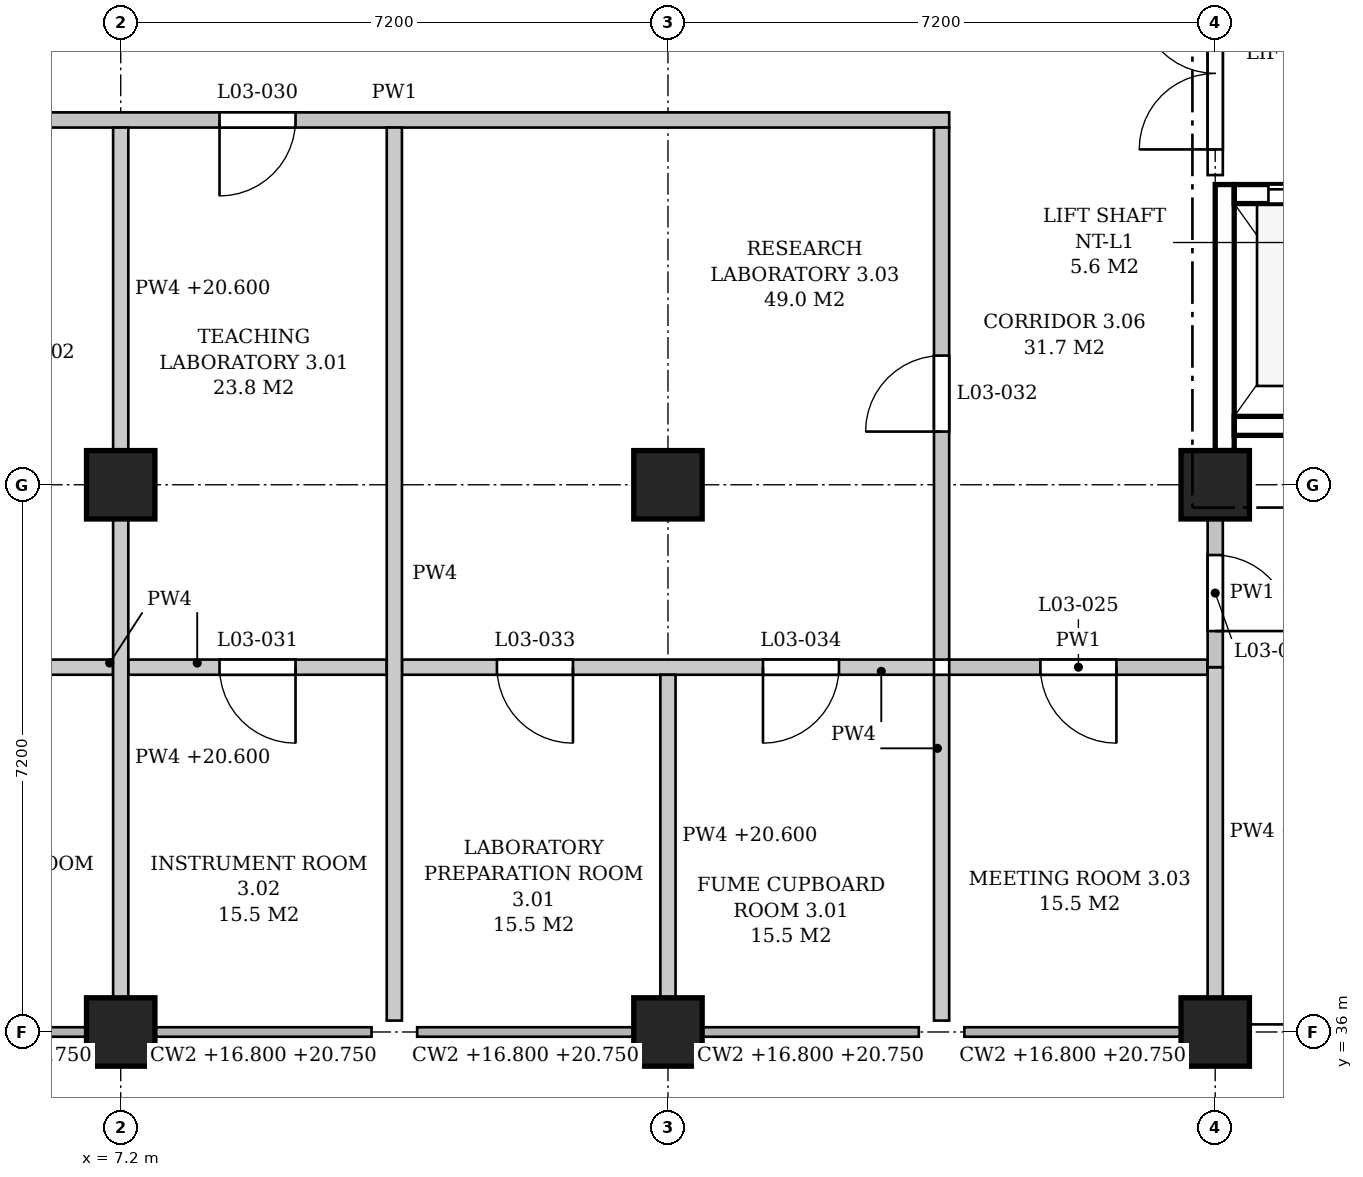
"""IFC4 building model, lengths in metres.
Left out: names, types, materials, properties, quantities, classifications, styles, units other than length and angle.
Written with IfcOpenShell. Run it as: python <this file> out.ifc"""

import sys

from ifc_helpers import new_model, si_unit, direction, frame, frame_2d, origin, origin_2d, place, context, subcontext, project, spatial, polyline, rectangle, outline, extrude, element, fill, save


model = new_model("IFC4")
c1 = context("Model", 3, precision=1e-05, world=origin(), true_north=direction((0.0, 1.0)))
c2 = subcontext(c1, "Body", "Model", "MODEL_VIEW")
j1 = project(units=[si_unit("LENGTHUNIT", "METRE"), si_unit("PLANEANGLEUNIT", "RADIAN")], contexts=[c1])
p1 = place(None, origin())
s1 = spatial("IfcSite", under=j1, at=p1, CompositionType="ELEMENT")
p2 = place(p1, origin())
s2 = spatial("IfcBuilding", under=s1, at=p2, CompositionType="ELEMENT")
p3 = place(p2, frame((0.0, 0.0, 16.8)))
s3 = spatial("IfcBuildingStorey", under=s2, at=p3, CompositionType="ELEMENT", Elevation=16.8)
for number, where, z_axis, x_axis in (
    (1, (7.2, 36.0, 0.0), (0.0, 0.0, 1.0), (1.0, 0.0, 0.0)),
    (2, (7.2, 43.2, 0.0), (0.0, 0.0, 1.0), (1.0, 0.0, 0.0)),
    (3, (14.4, 36.0, 0.0), (0.0, 0.0, 1.0), (1.0, 0.0, 0.0)),
    (4, (14.4, 43.2, 0.0), (0.0, 0.0, 1.0), (1.0, 0.0, 0.0)),
    (5, (21.6, 36.0, 0.0), (0.0, 0.0, 1.0), (1.0, 0.0, 0.0)),
    (6, (21.6, 43.2, 0.0), (0.0, 0.0, 1.0), (1.0, 0.0, 0.0)),
):
    element("IfcColumn", number, at=place(p3, frame(where, z_axis=z_axis, x_axis=x_axis)), inside=s3, PredefinedType="COLUMN", context=c2, shape_type="SweptSolid", body=[
        extrude(rectangle(XDim=0.9, YDim=0.9, at=origin_2d()), origin(), (0.0, 0.0, 1.0), 4.8),
    ])
p4 = place(p3, frame((21.725, 43.65, -0.25), z_axis=(0.0, 0.0, 1.0), x_axis=(0.0, 1.0, 0.0)))
e7 = element("IfcWall", 7, at=p4, inside=s3, PredefinedType="SHEAR", context=c2, shape_type="SweptSolid", body=[
    extrude(rectangle(XDim=3.5, YDim=0.25, at=frame_2d((1.75, 0.0))), origin(), (0.0, 0.0, 1.0), 4.05),
])
p5 = place(p3, frame((21.85, 47.025, -0.25), z_axis=(0.0, 0.0, 1.0), x_axis=(1.0, 0.0, 0.0)))
e8 = element("IfcWall", 8, at=p5, inside=s3, PredefinedType="SHEAR", context=c2, shape_type="SweptSolid", body=[
    extrude(rectangle(XDim=2.0, YDim=0.25, at=frame_2d((1.0, 0.0))), origin(), (0.0, 0.0, 1.0), 4.8),
])
p6 = place(p5, frame((0.45, 0.0, 0.25)))
e9 = element("IfcOpeningElement", 9, at=p6, cuts=e8, PredefinedType="OPENING", context=c2, shape_type="SweptSolid", body=[
    extrude(rectangle(XDim=1.1, YDim=2.1, at=frame_2d((0.55, 1.05))), frame((0.0, 0.135, 0.0), z_axis=(0.0, -1.0, 0.0), x_axis=(1.0, 0.0, 0.0)), (0.0, 0.0, 1.0), 0.27),
])
p7 = place(p3, frame((21.85, 43.975, -0.25), z_axis=(0.0, 0.0, 1.0), x_axis=(1.0, 0.0, 0.0)))
e10 = element("IfcWall", 10, at=p7, inside=s3, PredefinedType="SHEAR", context=c2, shape_type="SweptSolid", body=[
    extrude(rectangle(XDim=2.0, YDim=0.25, at=frame_2d((1.0, 0.0))), origin(), (0.0, 0.0, 1.0), 4.8),
])
p8 = place(p3, frame((3.7, 40.8, 0.0), z_axis=(0.0, 0.0, 1.0), x_axis=(1.0, 0.0, 0.0)))
e11 = element("IfcWall", 11, at=p8, inside=s3, PredefinedType="PARTITIONING", context=c2, shape_type="SweptSolid", body=[
    extrude(outline(polyline([(0.0, 0.0), (3.4, 0.0), (3.4, 3.8), (3.25, 3.8), (3.25, 4.55), (0.0, 4.55), (0.0, 0.0)])), frame((0.0, 0.1, 0.0), z_axis=(0.0, -1.0, 0.0), x_axis=(1.0, 0.0, 0.0)), (0.0, 0.0, 1.0), 0.2),
])
p9 = place(p8, frame((1.2, 0.0, 0.0)))
e12 = element("IfcOpeningElement", 12, at=p9, cuts=e11, PredefinedType="OPENING", context=c2, shape_type="SweptSolid", body=[
    extrude(rectangle(XDim=1.0, YDim=2.1, at=frame_2d((0.5, 1.05))), frame((0.0, 0.11, 0.0), z_axis=(0.0, -1.0, 0.0), x_axis=(1.0, 0.0, 0.0)), (0.0, 0.0, 1.0), 0.22),
])
p10 = place(p3, frame((7.3, 40.8, 0.0), z_axis=(0.0, 0.0, 1.0), x_axis=(1.0, 0.0, 0.0)))
e13 = element("IfcWall", 13, at=p10, inside=s3, PredefinedType="PARTITIONING", context=c2, shape_type="SweptSolid", body=[
    extrude(outline(polyline([(0.0, 0.0), (3.4, 0.0), (3.4, 4.55), (0.15, 4.55), (0.15, 3.8), (0.0, 3.8), (0.0, 0.0)])), frame((0.0, 0.1, 0.0), z_axis=(0.0, -1.0, 0.0), x_axis=(1.0, 0.0, 0.0)), (0.0, 0.0, 1.0), 0.2),
])
p11 = place(p10, frame((1.2, 0.0, 0.0)))
e14 = element("IfcOpeningElement", 14, at=p11, cuts=e13, PredefinedType="OPENING", context=c2, shape_type="SweptSolid", body=[
    extrude(rectangle(XDim=1.0, YDim=2.1, at=frame_2d((0.5, 1.05))), frame((0.0, 0.11, 0.0), z_axis=(0.0, -1.0, 0.0), x_axis=(1.0, 0.0, 0.0)), (0.0, 0.0, 1.0), 0.22),
])
p12 = place(p3, frame((10.9, 40.8, 0.0), z_axis=(0.0, 0.0, 1.0), x_axis=(1.0, 0.0, 0.0)))
e15 = element("IfcWall", 15, at=p12, inside=s3, PredefinedType="PARTITIONING", context=c2, shape_type="SweptSolid", body=[
    extrude(outline(polyline([(0.0, 0.0), (7.0, 0.0), (7.0, 4.55), (3.75, 4.55), (3.75, 3.8), (3.25, 3.8), (3.25, 4.55), (0.0, 4.55), (0.0, 0.0)])), frame((0.0, 0.1, 0.0), z_axis=(0.0, -1.0, 0.0), x_axis=(1.0, 0.0, 0.0)), (0.0, 0.0, 1.0), 0.2),
])
p13 = place(p12, frame((1.25, 0.0, 0.0)))
e16 = element("IfcOpeningElement", 16, at=p13, cuts=e15, PredefinedType="OPENING", context=c2, shape_type="SweptSolid", body=[
    extrude(rectangle(XDim=1.0, YDim=2.1, at=frame_2d((0.5, 1.05))), frame((0.0, 0.11, 0.0), z_axis=(0.0, -1.0, 0.0), x_axis=(1.0, 0.0, 0.0)), (0.0, 0.0, 1.0), 0.22),
])
p14 = place(p12, frame((4.75, 0.0, 0.0)))
e17 = element("IfcOpeningElement", 17, at=p14, cuts=e15, PredefinedType="OPENING", context=c2, shape_type="SweptSolid", body=[
    extrude(rectangle(XDim=1.0, YDim=2.1, at=frame_2d((0.5, 1.05))), frame((0.0, 0.11, 0.0), z_axis=(0.0, -1.0, 0.0), x_axis=(1.0, 0.0, 0.0)), (0.0, 0.0, 1.0), 0.22),
])
p15 = place(p3, frame((18.1, 40.8, 0.0), z_axis=(0.0, 0.0, 1.0), x_axis=(1.0, 0.0, 0.0)))
e18 = element("IfcWall", 18, at=p15, inside=s3, PredefinedType="PARTITIONING", context=c2, shape_type="SweptSolid", body=[
    extrude(outline(polyline([(0.0, 0.0), (3.4, 0.0), (3.4, 3.8), (3.25, 3.8), (3.25, 4.55), (0.0, 4.55), (0.0, 0.0)])), frame((0.0, 0.1, 0.0), z_axis=(0.0, -1.0, 0.0), x_axis=(1.0, 0.0, 0.0)), (0.0, 0.0, 1.0), 0.2),
])
p16 = place(p15, frame((1.2, 0.0, 0.0)))
e19 = element("IfcOpeningElement", 19, at=p16, cuts=e18, PredefinedType="OPENING", context=c2, shape_type="SweptSolid", body=[
    extrude(rectangle(XDim=1.0, YDim=2.1, at=frame_2d((0.5, 1.05))), frame((0.0, 0.11, 0.0), z_axis=(0.0, -1.0, 0.0), x_axis=(1.0, 0.0, 0.0)), (0.0, 0.0, 1.0), 0.22),
])
p17 = place(p3, frame((3.5, 48.0, 0.0), z_axis=(0.0, 0.0, 1.0), x_axis=(1.0, 0.0, 0.0)))
e20 = element("IfcWall", 20, at=p17, inside=s3, PredefinedType="PARTITIONING", context=c2, shape_type="SweptSolid", body=[
    extrude(outline(polyline([(0.0, 0.0), (14.6, 0.0), (14.6, 4.55), (11.15, 4.55), (11.15, 3.8), (10.65, 3.8), (10.65, 4.55), (3.95, 4.55), (3.95, 3.8), (3.45, 3.8), (3.45, 4.55), (0.0, 4.55), (0.0, 0.0)])), frame((0.0, 0.1, 0.0), z_axis=(0.0, -1.0, 0.0), x_axis=(1.0, 0.0, 0.0)), (0.0, 0.0, 1.0), 0.2),
])
p18 = place(p17, frame((1.4, 0.0, 0.0)))
e21 = element("IfcOpeningElement", 21, at=p18, cuts=e20, PredefinedType="OPENING", context=c2, shape_type="SweptSolid", body=[
    extrude(rectangle(XDim=1.0, YDim=2.1, at=frame_2d((0.5, 1.05))), frame((0.0, 0.11, 0.0), z_axis=(0.0, -1.0, 0.0), x_axis=(1.0, 0.0, 0.0)), (0.0, 0.0, 1.0), 0.22),
])
p19 = place(p17, frame((5.0, 0.0, 0.0)))
e22 = element("IfcOpeningElement", 22, at=p19, cuts=e20, PredefinedType="OPENING", context=c2, shape_type="SweptSolid", body=[
    extrude(rectangle(XDim=1.0, YDim=2.1, at=frame_2d((0.5, 1.05))), frame((0.0, 0.11, 0.0), z_axis=(0.0, -1.0, 0.0), x_axis=(1.0, 0.0, 0.0)), (0.0, 0.0, 1.0), 0.22),
])
p20 = place(p3, frame((7.2, 36.45, 0.0), z_axis=(0.0, 0.0, 1.0), x_axis=(0.0, 1.0, 0.0)))
e23 = element("IfcWall", 23, at=p20, inside=s3, PredefinedType="PARTITIONING", context=c2, shape_type="SweptSolid", body=[
    extrude(rectangle(XDim=6.3, YDim=0.2, at=frame_2d((3.15, 0.0))), origin(), (0.0, 0.0, 1.0), 3.8),
])
p21 = place(p3, frame((7.2, 43.65, 0.0), z_axis=(0.0, 0.0, 1.0), x_axis=(0.0, 1.0, 0.0)))
e24 = element("IfcWall", 24, at=p21, inside=s3, PredefinedType="PARTITIONING", context=c2, shape_type="SweptSolid", body=[
    extrude(rectangle(XDim=4.25, YDim=0.2, at=frame_2d((2.125, 0.0))), origin(), (0.0, 0.0, 1.0), 3.8),
])
p22 = place(p3, frame((10.8, 36.15, 0.0), z_axis=(0.0, 0.0, 1.0), x_axis=(0.0, 1.0, 0.0)))
e25 = element("IfcWall", 25, at=p22, inside=s3, PredefinedType="PARTITIONING", context=c2, shape_type="SweptSolid", body=[
    extrude(outline(polyline([(0.0, 0.0), (11.75, 0.0), (11.75, 4.55), (7.3, 4.55), (7.3, 3.8), (6.8, 3.8), (6.8, 4.55), (0.1, 4.55), (0.1, 3.95), (0.0, 3.95), (0.0, 0.0)])), frame((0.0, 0.1, 0.0), z_axis=(0.0, -1.0, 0.0), x_axis=(1.0, 0.0, 0.0)), (0.0, 0.0, 1.0), 0.2),
])
p23 = place(p3, frame((14.4, 36.45, 0.0), z_axis=(0.0, 0.0, 1.0), x_axis=(0.0, 1.0, 0.0)))
e26 = element("IfcWall", 26, at=p23, inside=s3, PredefinedType="PARTITIONING", context=c2, shape_type="SweptSolid", body=[
    extrude(rectangle(XDim=4.25, YDim=0.2, at=frame_2d((2.125, 0.0))), origin(), (0.0, 0.0, 1.0), 3.8),
])
p24 = place(p3, frame((18.0, 36.15, 0.0), z_axis=(0.0, 0.0, 1.0), x_axis=(0.0, 1.0, 0.0)))
e27 = element("IfcWall", 27, at=p24, inside=s3, PredefinedType="PARTITIONING", context=c2, shape_type="SweptSolid", body=[
    extrude(outline(polyline([(0.0, 0.0), (4.55, 0.0), (4.55, 4.55), (0.1, 4.55), (0.1, 3.95), (0.0, 3.95), (0.0, 0.0)])), frame((0.0, 0.1, 0.0), z_axis=(0.0, -1.0, 0.0), x_axis=(1.0, 0.0, 0.0)), (0.0, 0.0, 1.0), 0.2),
])
p25 = place(p3, frame((18.0, 40.9, 0.0), z_axis=(0.0, 0.0, 1.0), x_axis=(0.0, 1.0, 0.0)))
e28 = element("IfcWall", 28, at=p25, inside=s3, PredefinedType="PARTITIONING", context=c2, shape_type="SweptSolid", body=[
    extrude(outline(polyline([(0.0, 0.0), (7.0, 0.0), (7.0, 4.55), (2.55, 4.55), (2.55, 3.8), (2.05, 3.8), (2.05, 4.55), (0.0, 4.55), (0.0, 0.0)])), frame((0.0, 0.1, 0.0), z_axis=(0.0, -1.0, 0.0), x_axis=(1.0, 0.0, 0.0)), (0.0, 0.0, 1.0), 0.2),
])
p26 = place(p25, frame((3.0, 0.0, 0.0)))
e29 = element("IfcOpeningElement", 29, at=p26, cuts=e28, PredefinedType="OPENING", context=c2, shape_type="SweptSolid", body=[
    extrude(rectangle(XDim=1.0, YDim=2.1, at=frame_2d((0.5, 1.05))), frame((0.0, 0.11, 0.0), z_axis=(0.0, -1.0, 0.0), x_axis=(1.0, 0.0, 0.0)), (0.0, 0.0, 1.0), 0.22),
])
p27 = place(p3, frame((21.6, 36.45, 0.0), z_axis=(0.0, 0.0, 1.0), x_axis=(0.0, 1.0, 0.0)))
e30 = element("IfcWall", 30, at=p27, inside=s3, PredefinedType="PARTITIONING", context=c2, shape_type="SweptSolid", body=[
    extrude(rectangle(XDim=4.35, YDim=0.2, at=frame_2d((2.175, 0.0))), origin(), (0.0, 0.0, 1.0), 3.8),
])
p28 = place(p3, frame((21.6, 40.8, 0.0), z_axis=(0.0, 0.0, 1.0), x_axis=(0.0, 1.0, 0.0)))
e31 = element("IfcWall", 31, at=p28, inside=s3, PredefinedType="PARTITIONING", context=c2, shape_type="SweptSolid", body=[
    extrude(rectangle(XDim=1.95, YDim=0.2, at=frame_2d((0.975, 0.0))), origin(), (0.0, 0.0, 1.0), 3.8),
])
p29 = place(p28, frame((0.475, 0.0, 0.0)))
e32 = element("IfcOpeningElement", 32, at=p29, cuts=e31, PredefinedType="OPENING", context=c2, shape_type="SweptSolid", body=[
    extrude(rectangle(XDim=1.0, YDim=2.1, at=frame_2d((0.5, 1.05))), frame((0.0, 0.11, 0.0), z_axis=(0.0, -1.0, 0.0), x_axis=(1.0, 0.0, 0.0)), (0.0, 0.0, 1.0), 0.22),
])
p30 = place(p3, frame((21.6, 47.275, 0.0), z_axis=(0.0, 0.0, 1.0), x_axis=(0.0, 1.0, 0.0)))
e33 = element("IfcWall", 33, at=p30, inside=s3, PredefinedType="PARTITIONING", context=c2, shape_type="SweptSolid", body=[
    extrude(rectangle(XDim=2.675, YDim=0.2, at=frame_2d((1.337, 0.0))), origin(), (0.0, 0.0, 1.0), 3.8),
])
p31 = place(p30, frame((0.337, 0.0, 0.0)))
e34 = element("IfcOpeningElement", 34, at=p31, cuts=e33, PredefinedType="OPENING", context=c2, shape_type="SweptSolid", body=[
    extrude(rectangle(XDim=2.0, YDim=2.4, at=frame_2d((1.0, 1.2))), frame((0.0, 0.11, 0.0), z_axis=(0.0, -1.0, 0.0), x_axis=(1.0, 0.0, 0.0)), (0.0, 0.0, 1.0), 0.22),
])
p32 = place(p6, origin())
e35 = element("IfcDoor", 35, at=p32, inside=s3, OperationType="SLIDING_TO_LEFT", PredefinedType="DOOR", context=c2, shape_type="SweptSolid", body=[
    extrude(rectangle(XDim=1.1, YDim=2.1, at=frame_2d((0.55, 1.05))), frame((0.0, 0.025, 0.0), z_axis=(0.0, -1.0, 0.0), x_axis=(1.0, 0.0, 0.0)), (0.0, 0.0, 1.0), 0.05),
])
fill(e9, e35)
p33 = place(p31, origin())
e36 = element("IfcDoor", 36, at=p33, inside=s3, OperationType="DOUBLE_DOOR_SINGLE_SWING", PredefinedType="DOOR", context=c2, shape_type="SweptSolid", body=[
    extrude(rectangle(XDim=2.0, YDim=2.4, at=frame_2d((1.0, 1.2))), frame((0.0, 0.025, 0.0), z_axis=(0.0, -1.0, 0.0), x_axis=(1.0, 0.0, 0.0)), (0.0, 0.0, 1.0), 0.05),
])
fill(e34, e36)
p34 = place(p16, frame((1.0, 0.0, 0.0), z_axis=(0.0, 0.0, 1.0), x_axis=(-1.0, 0.0, 0.0)))
e37 = element("IfcDoor", 37, at=p34, inside=s3, OperationType="SINGLE_SWING_LEFT", PredefinedType="DOOR", context=c2, shape_type="SweptSolid", body=[
    extrude(rectangle(XDim=1.0, YDim=2.1, at=frame_2d((0.5, 1.05))), frame((0.0, 0.025, 0.0), z_axis=(0.0, -1.0, 0.0), x_axis=(1.0, 0.0, 0.0)), (0.0, 0.0, 1.0), 0.05),
])
fill(e19, e37)
p35 = place(p29, frame((1.0, 0.0, 0.0), z_axis=(0.0, 0.0, 1.0), x_axis=(-1.0, 0.0, 0.0)))
e38 = element("IfcDoor", 38, at=p35, inside=s3, OperationType="SINGLE_SWING_RIGHT", PredefinedType="DOOR", context=c2, shape_type="SweptSolid", body=[
    extrude(rectangle(XDim=1.0, YDim=2.1, at=frame_2d((0.5, 1.05))), frame((0.0, 0.025, 0.0), z_axis=(0.0, -1.0, 0.0), x_axis=(1.0, 0.0, 0.0)), (0.0, 0.0, 1.0), 0.05),
])
fill(e32, e38)
p36 = place(p19, frame((1.0, 0.0, 0.0), z_axis=(0.0, 0.0, 1.0), x_axis=(-1.0, 0.0, 0.0)))
e39 = element("IfcDoor", 39, at=p36, inside=s3, OperationType="SINGLE_SWING_RIGHT", PredefinedType="DOOR", context=c2, shape_type="SweptSolid", body=[
    extrude(rectangle(XDim=1.0, YDim=2.1, at=frame_2d((0.5, 1.05))), frame((0.0, 0.025, 0.0), z_axis=(0.0, -1.0, 0.0), x_axis=(1.0, 0.0, 0.0)), (0.0, 0.0, 1.0), 0.05),
])
fill(e22, e39)
p37 = place(p11, frame((1.0, 0.0, 0.0), z_axis=(0.0, 0.0, 1.0), x_axis=(-1.0, 0.0, 0.0)))
e40 = element("IfcDoor", 40, at=p37, inside=s3, OperationType="SINGLE_SWING_LEFT", PredefinedType="DOOR", context=c2, shape_type="SweptSolid", body=[
    extrude(rectangle(XDim=1.0, YDim=2.1, at=frame_2d((0.5, 1.05))), frame((0.0, 0.025, 0.0), z_axis=(0.0, -1.0, 0.0), x_axis=(1.0, 0.0, 0.0)), (0.0, 0.0, 1.0), 0.05),
])
fill(e14, e40)
p38 = place(p26, origin())
e41 = element("IfcDoor", 41, at=p38, inside=s3, OperationType="SINGLE_SWING_LEFT", PredefinedType="DOOR", context=c2, shape_type="SweptSolid", body=[
    extrude(rectangle(XDim=1.0, YDim=2.1, at=frame_2d((0.5, 1.05))), frame((0.0, 0.025, 0.0), z_axis=(0.0, -1.0, 0.0), x_axis=(1.0, 0.0, 0.0)), (0.0, 0.0, 1.0), 0.05),
])
fill(e29, e41)
p39 = place(p13, frame((1.0, 0.0, 0.0), z_axis=(0.0, 0.0, 1.0), x_axis=(-1.0, 0.0, 0.0)))
e42 = element("IfcDoor", 42, at=p39, inside=s3, OperationType="SINGLE_SWING_LEFT", PredefinedType="DOOR", context=c2, shape_type="SweptSolid", body=[
    extrude(rectangle(XDim=1.0, YDim=2.1, at=frame_2d((0.5, 1.05))), frame((0.0, 0.025, 0.0), z_axis=(0.0, -1.0, 0.0), x_axis=(1.0, 0.0, 0.0)), (0.0, 0.0, 1.0), 0.05),
])
fill(e16, e42)
p40 = place(p14, frame((1.0, 0.0, 0.0), z_axis=(0.0, 0.0, 1.0), x_axis=(-1.0, 0.0, 0.0)))
e43 = element("IfcDoor", 43, at=p40, inside=s3, OperationType="SINGLE_SWING_RIGHT", PredefinedType="DOOR", context=c2, shape_type="SweptSolid", body=[
    extrude(rectangle(XDim=1.0, YDim=2.1, at=frame_2d((0.5, 1.05))), frame((0.0, 0.025, 0.0), z_axis=(0.0, -1.0, 0.0), x_axis=(1.0, 0.0, 0.0)), (0.0, 0.0, 1.0), 0.05),
])
fill(e17, e43)
save(model, sys.argv[1])
